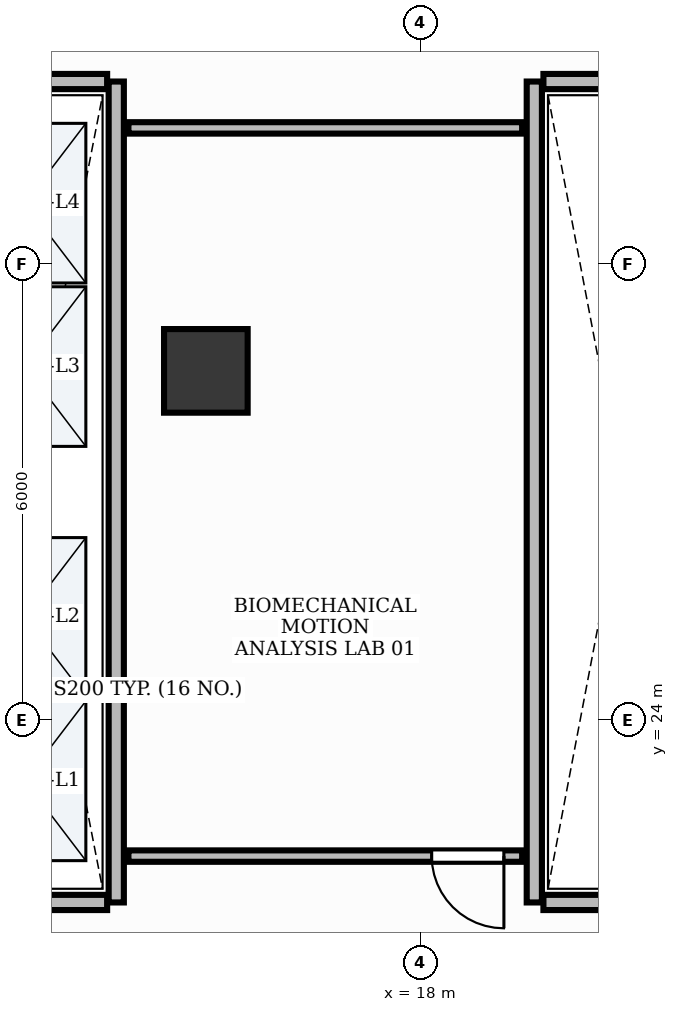
"""IFC4 building model, lengths in metres.
Left out: names, types, materials, properties, quantities, classifications, styles, units other than length and angle.
Written with IfcOpenShell. Run it as: python <this file> out.ifc"""

import sys

from ifc_helpers import new_model, si_unit, direction, frame, frame_2d, origin, origin_2d, place, context, subcontext, project, spatial, rectangle, extrude, element, fill, save


model = new_model("IFC4")
c1 = context("Model", 3, precision=1e-05, world=origin(), true_north=direction((0.0, 1.0)))
c2 = subcontext(c1, "Body", "Model", "MODEL_VIEW")
j1 = project(units=[si_unit("LENGTHUNIT", "METRE"), si_unit("PLANEANGLEUNIT", "RADIAN")], contexts=[c1])
p1 = place(None, origin())
s1 = spatial("IfcSite", under=j1, at=p1, CompositionType="ELEMENT")
p2 = place(p1, origin())
s2 = spatial("IfcBuilding", under=s1, at=p2, CompositionType="ELEMENT")
p3 = place(p2, frame((0.0, 0.0, 72.0)))
s3 = spatial("IfcBuildingStorey", under=s2, at=p3, CompositionType="ELEMENT", Elevation=72.0)
p4 = place(p3, frame((15.179, 28.594, -0.0), z_axis=(0.0, 0.0, 1.0), x_axis=(1.0, 0.0, 0.0)))
e1 = element("IfcColumn", 1, at=p4, inside=s3, PredefinedType="COLUMN", context=c2, shape_type="SweptSolid", body=[
    extrude(rectangle(XDim=1.1, YDim=1.1, at=origin_2d()), origin(), (0.0, 0.0, 1.0), 3.901),
])
p5 = place(p3, frame((14.0, 21.6, 0.0), z_axis=(0.0, 0.0, 1.0), x_axis=(0.0, 1.0, 0.0)))
e2 = element("IfcWall", 2, at=p5, inside=s3, PredefinedType="PARTITIONING", context=c2, shape_type="SweptSolid", body=[
    extrude(rectangle(XDim=10.8, YDim=0.2, at=frame_2d((5.4, 0.0))), origin(), (0.0, 0.0, 1.0), 2.91),
])
for number, where, z_axis, x_axis in (
    (3, (11.72, 21.6, 0.0), (0.0, 0.0, 1.0), (1.0, 0.0, 0.0)),
    (4, (11.72, 32.4, 0.0), (0.0, 0.0, 1.0), (1.0, 0.0, 0.0)),
):
    element("IfcWall", number, at=place(p3, frame(where, z_axis=z_axis, x_axis=x_axis)), inside=s3, PredefinedType="PARTITIONING", context=c2, shape_type="SweptSolid", body=[
        extrude(rectangle(XDim=2.16, YDim=0.2, at=frame_2d((1.08, 0.0))), origin(), (0.0, 0.0, 1.0), 2.91),
    ])
p6 = place(p3, frame((19.5, 21.6, 0.0), z_axis=(0.0, 0.0, 1.0), x_axis=(0.0, 1.0, 0.0)))
e5 = element("IfcWall", 5, at=p6, inside=s3, PredefinedType="PARTITIONING", context=c2, shape_type="SweptSolid", body=[
    extrude(rectangle(XDim=10.8, YDim=0.2, at=frame_2d((5.4, 0.0))), origin(), (0.0, 0.0, 1.0), 2.91),
])
for number, where, z_axis, x_axis in (
    (6, (19.62, 21.6, 0.0), (0.0, 0.0, 1.0), (1.0, 0.0, 0.0)),
    (7, (19.62, 32.4, 0.0), (0.0, 0.0, 1.0), (1.0, 0.0, 0.0)),
):
    element("IfcWall", number, at=place(p3, frame(where, z_axis=z_axis, x_axis=x_axis)), inside=s3, PredefinedType="PARTITIONING", context=c2, shape_type="SweptSolid", body=[
        extrude(rectangle(XDim=2.11, YDim=0.2, at=frame_2d((1.055, 0.0))), origin(), (0.0, 0.0, 1.0), 2.91),
    ])
p7 = place(p3, frame((19.34, 22.21, 0.0), z_axis=(0.0, 0.0, 1.0), x_axis=(-1.0, 0.0, 0.0)))
e8 = element("IfcWall", 8, at=p7, inside=s3, PredefinedType="PARTITIONING", context=c2, shape_type="SweptSolid", body=[
    extrude(rectangle(XDim=5.18, YDim=0.15, at=frame_2d((2.59, 0.0))), origin(), (0.0, 0.0, 1.0), 2.91),
])
p8 = place(p7, frame((0.24, 0.0, 0.0)))
e9 = element("IfcOpeningElement", 9, at=p8, cuts=e8, PredefinedType="OPENING", context=c2, shape_type="SweptSolid", body=[
    extrude(rectangle(XDim=0.95, YDim=2.15, at=frame_2d((0.475, 1.075))), frame((0.0, 0.09, 0.0), z_axis=(0.0, -1.0, 0.0), x_axis=(1.0, 0.0, 0.0)), (0.0, 0.0, 1.0), 0.18),
])
p9 = place(p3, frame((14.16, 31.79, 0.0), z_axis=(0.0, 0.0, 1.0), x_axis=(1.0, 0.0, 0.0)))
e10 = element("IfcWall", 10, at=p9, inside=s3, PredefinedType="PARTITIONING", context=c2, shape_type="SweptSolid", body=[
    extrude(rectangle(XDim=5.18, YDim=0.15, at=frame_2d((2.59, 0.0))), origin(), (0.0, 0.0, 1.0), 2.91),
])
p10 = place(p8, origin())
e11 = element("IfcDoor", 11, at=p10, inside=s3, OperationType="SINGLE_SWING_LEFT", PredefinedType="DOOR", context=c2, shape_type="SweptSolid", body=[
    extrude(rectangle(XDim=0.95, YDim=2.15, at=frame_2d((0.475, 1.075))), frame((0.0, 0.025, 0.0), z_axis=(0.0, -1.0, 0.0), x_axis=(1.0, 0.0, 0.0)), (0.0, 0.0, 1.0), 0.05),
])
fill(e9, e11)
save(model, sys.argv[1])
